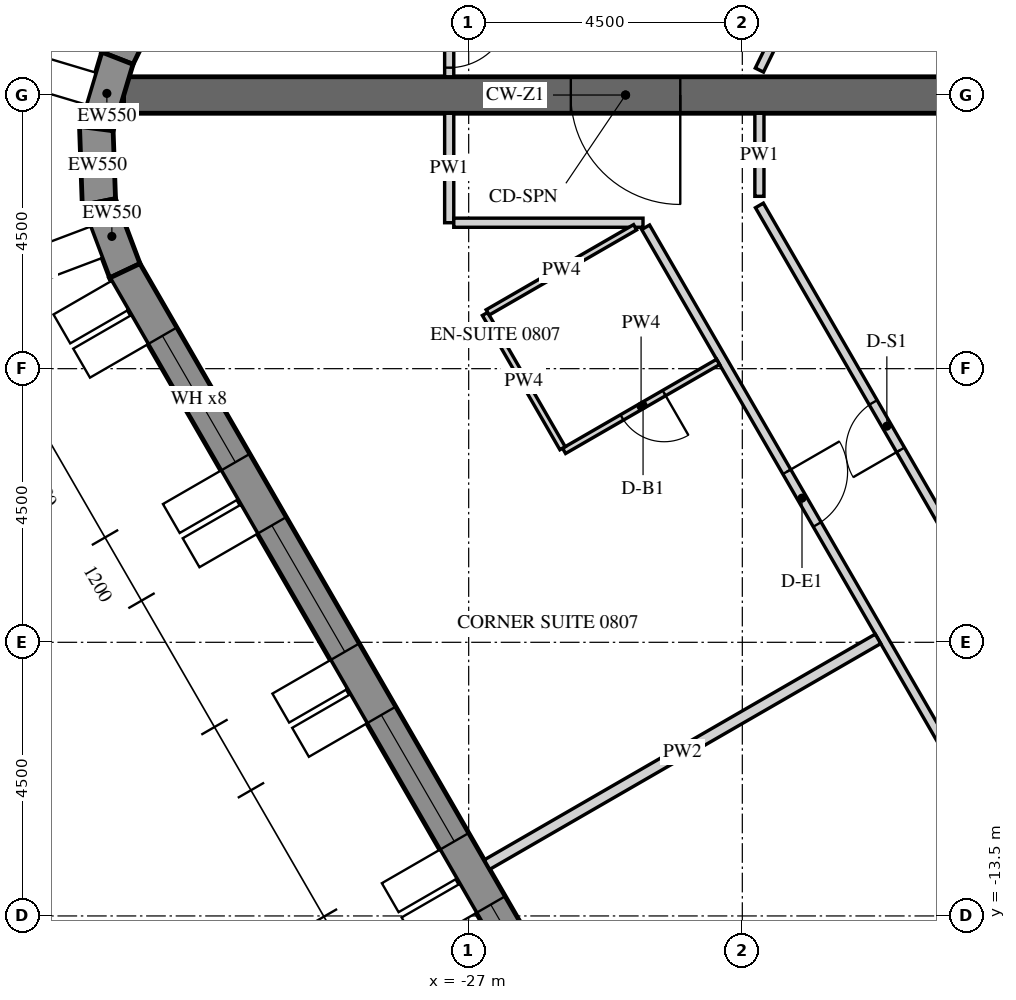
"""IFC4 building model, lengths in metres.
Left out: names, types, materials, properties, quantities, classifications, styles, units other than length and angle.
Written with IfcOpenShell. Run it as: python <this file> out.ifc"""

import sys

from ifc_helpers import new_model, si_unit, direction, frame, frame_2d, origin, place, context, subcontext, project, spatial, polyline, rectangle, outline, extrude, element, fill, save


model = new_model("IFC4")
c1 = context("Model", 3, precision=1e-05, world=origin(), true_north=direction((0.0, 1.0)))
c2 = subcontext(c1, "Body", "Model", "MODEL_VIEW")
j1 = project(units=[si_unit("LENGTHUNIT", "METRE"), si_unit("PLANEANGLEUNIT", "RADIAN")], contexts=[c1])
p1 = place(None, origin())
s1 = spatial("IfcSite", under=j1, at=p1, CompositionType="ELEMENT")
p2 = place(p1, origin())
s2 = spatial("IfcBuilding", under=s1, at=p2, CompositionType="ELEMENT")
p3 = place(p2, frame((0.0, 0.0, 111.6)))
s3 = spatial("IfcBuildingStorey", under=s2, at=p3, CompositionType="ELEMENT", Elevation=111.6)
p4 = place(p3, frame((-19.595, 27.633, -0.15), z_axis=(0.0, 0.0, 1.0), x_axis=(-0.438368285794, -0.898795441694, 0.0)))
e1 = element("IfcWall", 1, at=p4, inside=s3, PredefinedType="SOLIDWALL", context=c2, shape_type="SweptSolid", body=[
    extrude(outline(polyline([(-0.026, -0.275), (30.093, -0.275), (30.048, 0.275), (0.026, 0.275), (-0.026, -0.275)])), origin(), (0.0, 0.0, 1.0), 3.9),
])
p5 = place(p4, frame((1.236, 0.0, 1.05)))
e2 = element("IfcOpeningElement", 2, at=p5, cuts=e1, PredefinedType="OPENING", context=c2, shape_type="SweptSolid", body=[
    extrude(rectangle(XDim=2.4, YDim=2.4, at=frame_2d((1.2, 1.2))), frame((0.0, 0.285, 0.0), z_axis=(0.0, -1.0, 0.0), x_axis=(1.0, 0.0, 0.0)), (0.0, 0.0, 1.0), 0.57),
])
p6 = place(p4, frame((4.835, 0.0, 1.05)))
e3 = element("IfcOpeningElement", 3, at=p6, cuts=e1, PredefinedType="OPENING", context=c2, shape_type="SweptSolid", body=[
    extrude(rectangle(XDim=2.4, YDim=2.4, at=frame_2d((1.2, 1.2))), frame((0.0, 0.285, 0.0), z_axis=(0.0, -1.0, 0.0), x_axis=(1.0, 0.0, 0.0)), (0.0, 0.0, 1.0), 0.57),
])
p7 = place(p4, frame((8.436, 0.0, 1.05)))
e4 = element("IfcOpeningElement", 4, at=p7, cuts=e1, PredefinedType="OPENING", context=c2, shape_type="SweptSolid", body=[
    extrude(rectangle(XDim=2.4, YDim=2.4, at=frame_2d((1.2, 1.2))), frame((0.0, 0.285, 0.0), z_axis=(0.0, -1.0, 0.0), x_axis=(1.0, 0.0, 0.0)), (0.0, 0.0, 1.0), 0.57),
])
p8 = place(p4, frame((12.035, 0.0, 1.05)))
e5 = element("IfcOpeningElement", 5, at=p8, cuts=e1, PredefinedType="OPENING", context=c2, shape_type="SweptSolid", body=[
    extrude(rectangle(XDim=2.4, YDim=2.4, at=frame_2d((1.2, 1.2))), frame((0.0, 0.285, 0.0), z_axis=(0.0, -1.0, 0.0), x_axis=(1.0, 0.0, 0.0)), (0.0, 0.0, 1.0), 0.57),
])
p9 = place(p4, frame((15.635, 0.0, 1.05)))
e6 = element("IfcOpeningElement", 6, at=p9, cuts=e1, PredefinedType="OPENING", context=c2, shape_type="SweptSolid", body=[
    extrude(rectangle(XDim=2.4, YDim=2.4, at=frame_2d((1.2, 1.2))), frame((0.0, 0.285, 0.0), z_axis=(0.0, -1.0, 0.0), x_axis=(1.0, 0.0, 0.0)), (0.0, 0.0, 1.0), 0.57),
])
p10 = place(p4, frame((19.236, 0.0, 1.05)))
e7 = element("IfcOpeningElement", 7, at=p10, cuts=e1, PredefinedType="OPENING", context=c2, shape_type="SweptSolid", body=[
    extrude(rectangle(XDim=2.4, YDim=2.4, at=frame_2d((1.2, 1.2))), frame((0.0, 0.285, 0.0), z_axis=(0.0, -1.0, 0.0), x_axis=(1.0, 0.0, 0.0)), (0.0, 0.0, 1.0), 0.57),
])
p11 = place(p4, frame((22.835, 0.0, 1.05)))
e8 = element("IfcOpeningElement", 8, at=p11, cuts=e1, PredefinedType="OPENING", context=c2, shape_type="SweptSolid", body=[
    extrude(rectangle(XDim=2.4, YDim=2.4, at=frame_2d((1.2, 1.2))), frame((0.0, 0.285, 0.0), z_axis=(0.0, -1.0, 0.0), x_axis=(1.0, 0.0, 0.0)), (0.0, 0.0, 1.0), 0.57),
])
p12 = place(p4, frame((26.436, 0.0, 1.05)))
e9 = element("IfcOpeningElement", 9, at=p12, cuts=e1, PredefinedType="OPENING", context=c2, shape_type="SweptSolid", body=[
    extrude(rectangle(XDim=2.4, YDim=2.4, at=frame_2d((1.2, 1.2))), frame((0.0, 0.285, 0.0), z_axis=(0.0, -1.0, 0.0), x_axis=(1.0, 0.0, 0.0)), (0.0, 0.0, 1.0), 0.57),
])
p13 = place(p3, frame((-32.777, 0.605, -0.15), z_axis=(0.0, 0.0, 1.0), x_axis=(-0.286921497463, -0.957954098219, 0.0)))
e10 = element("IfcWall", 10, at=p13, inside=s3, PredefinedType="SOLIDWALL", context=c2, shape_type="SweptSolid", body=[
    extrude(outline(polyline([(-0.022, -0.275), (1.253, -0.275), (1.163, 0.275), (0.022, 0.275), (-0.022, -0.275)])), origin(), (0.0, 0.0, 1.0), 3.9),
])
p14 = place(p3, frame((-33.124, -0.552, -0.15), z_axis=(0.0, 0.0, 1.0), x_axis=(0.03495638276, -0.999388838893, 0.0)))
e11 = element("IfcWall", 11, at=p14, inside=s3, PredefinedType="SOLIDWALL", context=c2, shape_type="SweptSolid", body=[
    extrude(outline(polyline([(-0.045, -0.275), (1.253, -0.275), (1.163, 0.275), (0.045, 0.275), (-0.045, -0.275)])), origin(), (0.0, 0.0, 1.0), 3.9),
])
p15 = place(p3, frame((-33.081, -1.76, -0.15), z_axis=(0.0, 0.0, 1.0), x_axis=(0.353027214741, -0.935613053378, 0.0)))
e12 = element("IfcWall", 12, at=p15, inside=s3, PredefinedType="SOLIDWALL", context=c2, shape_type="SweptSolid", body=[
    extrude(outline(polyline([(-0.045, -0.275), (1.231, -0.275), (1.186, 0.275), (0.045, 0.275), (-0.045, -0.275)])), origin(), (0.0, 0.0, 1.0), 3.9),
])
p16 = place(p3, frame((-32.655, -2.89, -0.15), z_axis=(0.0, 0.0, 1.0), x_axis=(0.499997711317, -0.866026725152, 0.0)))
e13 = element("IfcWall", 13, at=p16, inside=s3, PredefinedType="SOLIDWALL", context=c2, shape_type="SweptSolid", body=[
    extrude(outline(polyline([(-0.022, -0.275), (30.097, -0.275), (30.045, 0.275), (0.022, 0.275), (-0.022, -0.275)])), origin(), (0.0, 0.0, 1.0), 3.9),
])
p17 = place(p16, frame((1.236, 0.0, 1.05)))
e14 = element("IfcOpeningElement", 14, at=p17, cuts=e13, PredefinedType="OPENING", context=c2, shape_type="SweptSolid", body=[
    extrude(rectangle(XDim=2.4, YDim=2.4, at=frame_2d((1.2, 1.2))), frame((0.0, 0.285, 0.0), z_axis=(0.0, -1.0, 0.0), x_axis=(1.0, 0.0, 0.0)), (0.0, 0.0, 1.0), 0.57),
])
p18 = place(p16, frame((4.835, 0.0, 1.05)))
e15 = element("IfcOpeningElement", 15, at=p18, cuts=e13, PredefinedType="OPENING", context=c2, shape_type="SweptSolid", body=[
    extrude(rectangle(XDim=2.4, YDim=2.4, at=frame_2d((1.2, 1.2))), frame((0.0, 0.285, 0.0), z_axis=(0.0, -1.0, 0.0), x_axis=(1.0, 0.0, 0.0)), (0.0, 0.0, 1.0), 0.57),
])
p19 = place(p16, frame((8.436, 0.0, 1.05)))
e16 = element("IfcOpeningElement", 16, at=p19, cuts=e13, PredefinedType="OPENING", context=c2, shape_type="SweptSolid", body=[
    extrude(rectangle(XDim=2.4, YDim=2.4, at=frame_2d((1.2, 1.2))), frame((0.0, 0.285, 0.0), z_axis=(0.0, -1.0, 0.0), x_axis=(1.0, 0.0, 0.0)), (0.0, 0.0, 1.0), 0.57),
])
p20 = place(p16, frame((12.035, 0.0, 1.05)))
e17 = element("IfcOpeningElement", 17, at=p20, cuts=e13, PredefinedType="OPENING", context=c2, shape_type="SweptSolid", body=[
    extrude(rectangle(XDim=2.4, YDim=2.4, at=frame_2d((1.2, 1.2))), frame((0.0, 0.285, 0.0), z_axis=(0.0, -1.0, 0.0), x_axis=(1.0, 0.0, 0.0)), (0.0, 0.0, 1.0), 0.57),
])
p21 = place(p16, frame((15.635, 0.0, 1.05)))
e18 = element("IfcOpeningElement", 18, at=p21, cuts=e13, PredefinedType="OPENING", context=c2, shape_type="SweptSolid", body=[
    extrude(rectangle(XDim=2.4, YDim=2.4, at=frame_2d((1.2, 1.2))), frame((0.0, 0.285, 0.0), z_axis=(0.0, -1.0, 0.0), x_axis=(1.0, 0.0, 0.0)), (0.0, 0.0, 1.0), 0.57),
])
p22 = place(p16, frame((19.236, 0.0, 1.05)))
e19 = element("IfcOpeningElement", 19, at=p22, cuts=e13, PredefinedType="OPENING", context=c2, shape_type="SweptSolid", body=[
    extrude(rectangle(XDim=2.4, YDim=2.4, at=frame_2d((1.2, 1.2))), frame((0.0, 0.285, 0.0), z_axis=(0.0, -1.0, 0.0), x_axis=(1.0, 0.0, 0.0)), (0.0, 0.0, 1.0), 0.57),
])
p23 = place(p16, frame((22.835, 0.0, 1.05)))
e20 = element("IfcOpeningElement", 20, at=p23, cuts=e13, PredefinedType="OPENING", context=c2, shape_type="SweptSolid", body=[
    extrude(rectangle(XDim=2.4, YDim=2.4, at=frame_2d((1.2, 1.2))), frame((0.0, 0.285, 0.0), z_axis=(0.0, -1.0, 0.0), x_axis=(1.0, 0.0, 0.0)), (0.0, 0.0, 1.0), 0.57),
])
p24 = place(p16, frame((26.436, 0.0, 1.05)))
e21 = element("IfcOpeningElement", 21, at=p24, cuts=e13, PredefinedType="OPENING", context=c2, shape_type="SweptSolid", body=[
    extrude(rectangle(XDim=2.4, YDim=2.4, at=frame_2d((1.2, 1.2))), frame((0.0, 0.285, 0.0), z_axis=(0.0, -1.0, 0.0), x_axis=(1.0, 0.0, 0.0)), (0.0, 0.0, 1.0), 0.57),
])
p25 = place(p3, frame((-16.166, 0.0, -0.15), z_axis=(0.0, 0.0, 1.0), x_axis=(-1.0, 0.0, 0.0)))
e22 = element("IfcWall", 22, at=p25, inside=s3, PredefinedType="SHEAR", context=c2, shape_type="SweptSolid", body=[
    extrude(rectangle(XDim=16.509, YDim=0.6, at=frame_2d((8.254, 0.0))), origin(), (0.0, 0.0, 1.0), 3.9),
])
p26 = place(p25, frame((7.354, 0.0, 0.15)))
e23 = element("IfcOpeningElement", 23, at=p26, cuts=e22, PredefinedType="OPENING", context=c2, shape_type="SweptSolid", body=[
    extrude(rectangle(XDim=1.8, YDim=2.4, at=frame_2d((0.9, 1.2))), frame((0.0, 0.31, 0.0), z_axis=(0.0, -1.0, 0.0), x_axis=(1.0, 0.0, 0.0)), (0.0, 0.0, 1.0), 0.62),
])
p27 = place(p3, frame((-27.32, 2.025, 0.0), z_axis=(0.0, 0.0, 1.0), x_axis=(0.0, -1.0, 0.0)))
e24 = element("IfcWall", 24, at=p27, inside=s3, PredefinedType="PARTITIONING", context=c2, shape_type="SweptSolid", body=[
    extrude(rectangle(XDim=1.725, YDim=0.15, at=frame_2d((0.862, 0.0))), origin(), (0.0, 0.0, 1.0), 2.988),
])
p28 = place(p27, frame((0.575, 0.0, 0.0)))
e25 = element("IfcOpeningElement", 25, at=p28, cuts=e24, PredefinedType="OPENING", context=c2, shape_type="SweptSolid", body=[
    extrude(rectangle(XDim=1.0, YDim=2.1, at=frame_2d((0.5, 1.05))), frame((0.0, 0.085, 0.0), z_axis=(0.0, -1.0, 0.0), x_axis=(1.0, 0.0, 0.0)), (0.0, 0.0, 1.0), 0.17),
])
p29 = place(p3, frame((-22.219, 0.41, 0.0), z_axis=(0.0, 0.0, 1.0), x_axis=(0.438391891827, 0.898783927972, 0.0)))
e26 = element("IfcWall", 26, at=p29, inside=s3, PredefinedType="PARTITIONING", context=c2, shape_type="SweptSolid", body=[
    extrude(rectangle(XDim=9.699, YDim=0.15, at=frame_2d((4.85, 0.0))), origin(), (0.0, 0.0, 1.0), 2.988),
])
p30 = place(p29, frame((4.4, 0.0, 0.0)))
e27 = element("IfcOpeningElement", 27, at=p30, cuts=e26, PredefinedType="OPENING", context=c2, shape_type="SweptSolid", body=[
    extrude(rectangle(XDim=0.9, YDim=2.1, at=frame_2d((0.45, 1.05))), frame((0.0, 0.085, 0.0), z_axis=(0.0, -1.0, 0.0), x_axis=(1.0, 0.0, 0.0)), (0.0, 0.0, 1.0), 0.17),
])
p31 = place(p3, frame((-27.32, -0.3, 0.0), z_axis=(0.0, 0.0, 1.0), x_axis=(0.0, -1.0, 0.0)))
e28 = element("IfcWall", 28, at=p31, inside=s3, PredefinedType="PARTITIONING", context=c2, shape_type="SweptSolid", body=[
    extrude(rectangle(XDim=1.8, YDim=0.15, at=frame_2d((0.9, 0.0))), origin(), (0.0, 0.0, 1.0), 2.988),
])
p32 = place(p3, frame((-27.245, -2.1, 0.0), z_axis=(0.0, 0.0, 1.0), x_axis=(1.0, 0.0, 0.0)))
e29 = element("IfcWall", 29, at=p32, inside=s3, PredefinedType="PARTITIONING", context=c2, shape_type="SweptSolid", body=[
    extrude(rectangle(XDim=3.112, YDim=0.15, at=frame_2d((1.556, 0.0))), origin(), (0.0, 0.0, 1.0), 2.988),
])
p33 = place(p3, frame((-24.09, -2.175, 0.0), z_axis=(0.0, 0.0, 1.0), x_axis=(0.499996832073, -0.86602723278, 0.0)))
e30 = element("IfcWall", 30, at=p33, inside=s3, PredefinedType="PARTITIONING", context=c2, shape_type="SweptSolid", body=[
    extrude(rectangle(XDim=23.877, YDim=0.15, at=frame_2d((11.938, 0.0))), origin(), (0.0, 0.0, 1.0), 2.988),
])
p34 = place(p33, frame((4.643, 0.0, 0.0)))
e31 = element("IfcOpeningElement", 31, at=p34, cuts=e30, PredefinedType="OPENING", context=c2, shape_type="SweptSolid", body=[
    extrude(rectangle(XDim=1.0, YDim=2.1, at=frame_2d((0.5, 1.05))), frame((0.0, 0.085, 0.0), z_axis=(0.0, -1.0, 0.0), x_axis=(1.0, 0.0, 0.0)), (0.0, 0.0, 1.0), 0.17),
])
p35 = place(p33, frame((11.472, 0.0, 0.0)))
e32 = element("IfcOpeningElement", 32, at=p35, cuts=e30, PredefinedType="OPENING", context=c2, shape_type="SweptSolid", body=[
    extrude(rectangle(XDim=1.0, YDim=2.1, at=frame_2d((0.5, 1.05))), frame((0.0, 0.085, 0.0), z_axis=(0.0, -1.0, 0.0), x_axis=(1.0, 0.0, 0.0)), (0.0, 0.0, 1.0), 0.17),
])
p36 = place(p33, frame((21.925, 0.0, 0.0)))
e33 = element("IfcOpeningElement", 33, at=p36, cuts=e30, PredefinedType="OPENING", context=c2, shape_type="SweptSolid", body=[
    extrude(rectangle(XDim=1.0, YDim=2.1, at=frame_2d((0.5, 1.05))), frame((0.0, 0.085, 0.0), z_axis=(0.0, -1.0, 0.0), x_axis=(1.0, 0.0, 0.0)), (0.0, 0.0, 1.0), 0.17),
])
p37 = place(p3, frame((-18.027, -9.076, 0.0), z_axis=(0.0, 0.0, 1.0), x_axis=(-0.500007318041, 0.86602117867, 0.0)))
e34 = element("IfcWall", 34, at=p37, inside=s3, PredefinedType="PARTITIONING", context=c2, shape_type="SweptSolid", body=[
    extrude(rectangle(XDim=8.383, YDim=0.15, at=frame_2d((4.191, 0.0))), origin(), (0.0, 0.0, 1.0), 2.988),
])
p38 = place(p37, frame((3.742, 0.0, 0.0)))
e35 = element("IfcOpeningElement", 35, at=p38, cuts=e34, PredefinedType="OPENING", context=c2, shape_type="SweptSolid", body=[
    extrude(rectangle(XDim=0.9, YDim=2.1, at=frame_2d((0.45, 1.05))), frame((0.0, 0.085, 0.0), z_axis=(0.0, -1.0, 0.0), x_axis=(1.0, 0.0, 0.0)), (0.0, 0.0, 1.0), 0.17),
])
p39 = place(p3, frame((-22.219, -1.666, 0.0), z_axis=(0.0, 0.0, 1.0), x_axis=(0.0, 1.0, 0.0)))
e36 = element("IfcWall", 36, at=p39, inside=s3, PredefinedType="PARTITIONING", context=c2, shape_type="SweptSolid", body=[
    extrude(rectangle(XDim=1.366, YDim=0.15, at=frame_2d((0.683, 0.0))), origin(), (0.0, 0.0, 1.0), 2.988),
])
p40 = place(p3, frame((-22.898, -4.389, 0.0), z_axis=(0.0, 0.0, 1.0), x_axis=(-0.866046596414, -0.499963291492, 0.0)))
e37 = element("IfcWall", 37, at=p40, inside=s3, PredefinedType="PARTITIONING", context=c2, shape_type="SweptSolid", body=[
    extrude(rectangle(XDim=2.925, YDim=0.1, at=frame_2d((1.462, 0.0))), origin(), (0.0, 0.0, 1.0), 2.988),
])
p41 = place(p40, frame((1.025, 0.0, 0.0)))
e38 = element("IfcOpeningElement", 38, at=p41, cuts=e37, PredefinedType="OPENING", context=c2, shape_type="SweptSolid", body=[
    extrude(rectangle(XDim=0.8, YDim=2.1, at=frame_2d((0.4, 1.05))), frame((0.0, 0.06, 0.0), z_axis=(0.0, -1.0, 0.0), x_axis=(1.0, 0.0, 0.0)), (0.0, 0.0, 1.0), 0.12),
])
p42 = place(p3, frame((-25.456, -5.808, 0.0), z_axis=(0.0, 0.0, 1.0), x_axis=(-0.499990435942, 0.866030925526, 0.0)))
e39 = element("IfcWall", 39, at=p42, inside=s3, PredefinedType="PARTITIONING", context=c2, shape_type="SweptSolid", body=[
    extrude(rectangle(XDim=2.55, YDim=0.1, at=frame_2d((1.275, 0.0))), origin(), (0.0, 0.0, 1.0), 2.988),
])
p43 = place(p3, frame((-26.688, -3.575, 0.0), z_axis=(0.0, 0.0, 1.0), x_axis=(0.866034573852, 0.49998411664, 0.0)))
e40 = element("IfcWall", 40, at=p43, inside=s3, PredefinedType="PARTITIONING", context=c2, shape_type="SweptSolid", body=[
    extrude(rectangle(XDim=2.8, YDim=0.1, at=frame_2d((1.4, 0.0))), origin(), (0.0, 0.0, 1.0), 2.988),
])
p44 = place(p3, frame((-26.699, -12.656, 0.0), z_axis=(0.0, 0.0, 1.0), x_axis=(0.866028983062, 0.499993800457, 0.0)))
e41 = element("IfcWall", 41, at=p44, inside=s3, PredefinedType="PARTITIONING", context=c2, shape_type="SweptSolid", body=[
    extrude(rectangle(XDim=7.425, YDim=0.18, at=frame_2d((3.712, 0.0))), origin(), (0.0, 0.0, 1.0), 2.988),
])
p45 = place(p17, frame((0.0, 0.205, 0.0)))
e42 = element("IfcWindow", 42, at=p45, inside=s3, PartitioningType="DOUBLE_PANEL_VERTICAL", PredefinedType="WINDOW", context=c2, shape_type="SweptSolid", body=[
    extrude(rectangle(XDim=2.4, YDim=2.4, at=frame_2d((1.2, 1.2))), frame((0.0, 0.03, 0.0), z_axis=(0.0, -1.0, 0.0), x_axis=(1.0, 0.0, 0.0)), (0.0, 0.0, 1.0), 0.06),
])
fill(e14, e42)
p46 = place(p18, frame((0.0, 0.205, 0.0)))
e43 = element("IfcWindow", 43, at=p46, inside=s3, PartitioningType="DOUBLE_PANEL_VERTICAL", PredefinedType="WINDOW", context=c2, shape_type="SweptSolid", body=[
    extrude(rectangle(XDim=2.4, YDim=2.4, at=frame_2d((1.2, 1.2))), frame((0.0, 0.03, 0.0), z_axis=(0.0, -1.0, 0.0), x_axis=(1.0, 0.0, 0.0)), (0.0, 0.0, 1.0), 0.06),
])
fill(e15, e43)
p47 = place(p19, frame((0.0, 0.205, 0.0)))
e44 = element("IfcWindow", 44, at=p47, inside=s3, PartitioningType="DOUBLE_PANEL_VERTICAL", PredefinedType="WINDOW", context=c2, shape_type="SweptSolid", body=[
    extrude(rectangle(XDim=2.4, YDim=2.4, at=frame_2d((1.2, 1.2))), frame((0.0, 0.03, 0.0), z_axis=(0.0, -1.0, 0.0), x_axis=(1.0, 0.0, 0.0)), (0.0, 0.0, 1.0), 0.06),
])
fill(e16, e44)
p48 = place(p20, frame((0.0, 0.205, 0.0)))
e45 = element("IfcWindow", 45, at=p48, inside=s3, PartitioningType="DOUBLE_PANEL_VERTICAL", PredefinedType="WINDOW", context=c2, shape_type="SweptSolid", body=[
    extrude(rectangle(XDim=2.4, YDim=2.4, at=frame_2d((1.2, 1.2))), frame((0.0, 0.03, 0.0), z_axis=(0.0, -1.0, 0.0), x_axis=(1.0, 0.0, 0.0)), (0.0, 0.0, 1.0), 0.06),
])
fill(e17, e45)
p49 = place(p26, origin())
e46 = element("IfcDoor", 46, at=p49, inside=s3, OperationType="DOUBLE_DOOR_SINGLE_SWING", PredefinedType="DOOR", context=c2, shape_type="SweptSolid", body=[
    extrude(rectangle(XDim=1.8, YDim=2.4, at=frame_2d((0.9, 1.2))), frame((0.0, 0.025, 0.0), z_axis=(0.0, -1.0, 0.0), x_axis=(1.0, 0.0, 0.0)), (0.0, 0.0, 1.0), 0.05),
])
fill(e23, e46)
p50 = place(p28, origin())
e47 = element("IfcDoor", 47, at=p50, inside=s3, OperationType="SINGLE_SWING_LEFT", PredefinedType="DOOR", context=c2, shape_type="SweptSolid", body=[
    extrude(rectangle(XDim=1.0, YDim=2.1, at=frame_2d((0.5, 1.05))), frame((0.0, 0.025, 0.0), z_axis=(0.0, -1.0, 0.0), x_axis=(1.0, 0.0, 0.0)), (0.0, 0.0, 1.0), 0.05),
])
fill(e25, e47)
p51 = place(p34, origin())
e48 = element("IfcDoor", 48, at=p51, inside=s3, OperationType="SINGLE_SWING_RIGHT", PredefinedType="DOOR", context=c2, shape_type="SweptSolid", body=[
    extrude(rectangle(XDim=1.0, YDim=2.1, at=frame_2d((0.5, 1.05))), frame((0.0, 0.025, 0.0), z_axis=(0.0, -1.0, 0.0), x_axis=(1.0, 0.0, 0.0)), (0.0, 0.0, 1.0), 0.05),
])
fill(e31, e48)
p52 = place(p41, origin())
e49 = element("IfcDoor", 49, at=p52, inside=s3, OperationType="SINGLE_SWING_RIGHT", PredefinedType="DOOR", context=c2, shape_type="SweptSolid", body=[
    extrude(rectangle(XDim=0.8, YDim=2.1, at=frame_2d((0.4, 1.05))), frame((0.0, 0.025, 0.0), z_axis=(0.0, -1.0, 0.0), x_axis=(1.0, 0.0, 0.0)), (0.0, 0.0, 1.0), 0.05),
])
fill(e38, e49)
p53 = place(p38, origin())
e50 = element("IfcDoor", 50, at=p53, inside=s3, OperationType="SINGLE_SWING_RIGHT", PredefinedType="DOOR", context=c2, shape_type="SweptSolid", body=[
    extrude(rectangle(XDim=0.9, YDim=2.1, at=frame_2d((0.45, 1.05))), frame((0.0, 0.025, 0.0), z_axis=(0.0, -1.0, 0.0), x_axis=(1.0, 0.0, 0.0)), (0.0, 0.0, 1.0), 0.05),
])
fill(e35, e50)
save(model, sys.argv[1])
